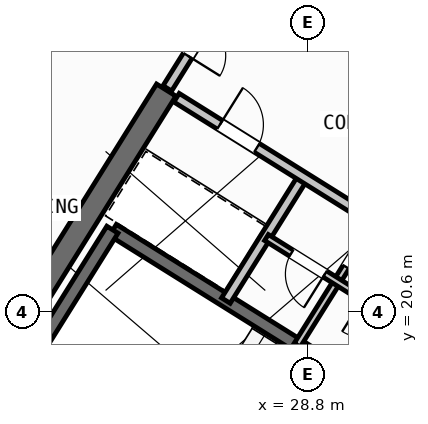
"""IFC4 building model, lengths in metres.
Left out: names, types, materials, properties, quantities, classifications, styles, units other than length and angle.
Written with IfcOpenShell. Run it as: python <this file> out.ifc"""

import sys

from ifc_helpers import new_model, si_unit, direction, frame, frame_2d, origin, place, context, subcontext, project, spatial, rectangle, extrude, source, transform, mapped, element, fill, save


model = new_model("IFC4")
c1 = context("Model", 3, precision=1e-05, world=origin(), true_north=direction((0.0, 1.0)))
c2 = subcontext(c1, "Body", "Model", "MODEL_VIEW")
j1 = project(units=[si_unit("LENGTHUNIT", "METRE"), si_unit("PLANEANGLEUNIT", "RADIAN")], contexts=[c1])
p1 = place(None, origin())
s1 = spatial("IfcSite", under=j1, at=p1, CompositionType="ELEMENT")
p2 = place(p1, origin())
s2 = spatial("IfcBuilding", under=s1, at=p2, CompositionType="ELEMENT")
p3 = place(p2, frame((0.0, 0.0, 277.2)))
s3 = spatial("IfcBuildingStorey", under=s2, at=p3, CompositionType="ELEMENT", Elevation=277.2)
p4 = place(p3, frame((40.531, 24.036, 0.0), z_axis=(0.0, 0.0, 1.0), x_axis=(-0.848048787466, 0.529918157905, 0.0)))
e1 = element("IfcWall", 1, at=p4, inside=s3, PredefinedType="SHEAR", context=c2, shape_type="SweptSolid", body=[
    extrude(rectangle(XDim=13.04, YDim=0.45, at=frame_2d((6.52, 0.0))), origin(), (0.0, 0.0, 1.0), 3.35),
])
p5 = place(p3, frame((26.007, 24.976, 0.0), z_axis=(0.0, 0.0, 1.0), x_axis=(-0.529931155655, -0.848040665456, 0.0)))
e2 = element("IfcWall", 2, at=p5, inside=s3, PredefinedType="SHEAR", context=c2, shape_type="SweptSolid", body=[
    extrude(rectangle(XDim=6.475, YDim=0.45, at=frame_2d((3.238, 0.0))), origin(), (0.0, 0.0, 1.0), 3.35),
])
p6 = place(p3, frame((29.268, 6.429, 0.0), z_axis=(0.0, 0.0, 1.0), x_axis=(-0.848049971435, 0.529916263149, 0.0)))
e3 = element("IfcWall", 3, at=p6, inside=s3, PredefinedType="STANDARD", context=c2, shape_type="SweptSolid", body=[
    extrude(rectangle(XDim=31.588, YDim=0.32, at=frame_2d((15.794, 0.0))), origin(), (0.0, 0.0, 1.0), 3.35),
])
p7 = place(p6, frame((16.362, 0.0, 0.0)))
e4 = element("IfcOpeningElement", 4, at=p7, cuts=e3, PredefinedType="OPENING", context=c2, shape_type="SweptSolid", body=[
    extrude(rectangle(XDim=1.2, YDim=2.15, at=frame_2d((0.6, 1.075))), frame((0.0, 0.17, 0.0), z_axis=(0.0, -1.0, 0.0), x_axis=(1.0, 0.0, 0.0)), (0.0, 0.0, 1.0), 0.34),
])
p8 = place(p6, frame((3.859, 0.0, 0.9)))
e5 = element("IfcOpeningElement", 5, at=p8, cuts=e3, PredefinedType="OPENING", context=c2, shape_type="SweptSolid", body=[
    extrude(rectangle(XDim=1.65, YDim=1.45, at=frame_2d((0.825, 0.725))), frame((0.0, 0.17, 0.0), z_axis=(0.0, -1.0, 0.0), x_axis=(1.0, 0.0, 0.0)), (0.0, 0.0, 1.0), 0.34),
])
p9 = place(p6, frame((10.519, 0.0, 0.9)))
e6 = element("IfcOpeningElement", 6, at=p9, cuts=e3, PredefinedType="OPENING", context=c2, shape_type="SweptSolid", body=[
    extrude(rectangle(XDim=1.65, YDim=1.45, at=frame_2d((0.825, 0.725))), frame((0.0, 0.17, 0.0), z_axis=(0.0, -1.0, 0.0), x_axis=(1.0, 0.0, 0.0)), (0.0, 0.0, 1.0), 0.34),
])
p10 = place(p6, frame((20.015, 0.0, 0.95)))
e7 = element("IfcOpeningElement", 7, at=p10, cuts=e3, PredefinedType="OPENING", context=c2, shape_type="SweptSolid", body=[
    extrude(rectangle(XDim=1.95, YDim=1.35, at=frame_2d((0.975, 0.675))), frame((0.0, 0.17, 0.0), z_axis=(0.0, -1.0, 0.0), x_axis=(1.0, 0.0, 0.0)), (0.0, 0.0, 1.0), 0.34),
])
p11 = place(p6, frame((23.715, 0.0, 1.0)))
e8 = element("IfcOpeningElement", 8, at=p11, cuts=e3, PredefinedType="OPENING", context=c2, shape_type="SweptSolid", body=[
    extrude(rectangle(XDim=0.9, YDim=1.25, at=frame_2d((0.45, 0.625))), frame((0.0, 0.17, 0.0), z_axis=(0.0, -1.0, 0.0), x_axis=(1.0, 0.0, 0.0)), (0.0, 0.0, 1.0), 0.34),
])
p12 = place(p6, frame((27.706, 0.0, 0.9)))
e9 = element("IfcOpeningElement", 9, at=p12, cuts=e3, PredefinedType="OPENING", context=c2, shape_type="SweptSolid", body=[
    extrude(rectangle(XDim=1.65, YDim=1.45, at=frame_2d((0.825, 0.725))), frame((0.0, 0.17, 0.0), z_axis=(0.0, -1.0, 0.0), x_axis=(1.0, 0.0, 0.0)), (0.0, 0.0, 1.0), 0.34),
])
p13 = place(p3, frame((14.138, 41.825, 0.0), z_axis=(0.0, 0.0, 1.0), x_axis=(0.848046498049, -0.529921821731, 0.0)))
e10 = element("IfcWall", 10, at=p13, inside=s3, PredefinedType="STANDARD", context=c2, shape_type="SweptSolid", body=[
    extrude(rectangle(XDim=31.588, YDim=0.32, at=frame_2d((15.794, 0.0))), origin(), (0.0, 0.0, 1.0), 3.35),
])
p14 = place(p13, frame((3.568, 0.0, 0.0)))
e11 = element("IfcOpeningElement", 11, at=p14, cuts=e10, PredefinedType="OPENING", context=c2, shape_type="SweptSolid", body=[
    extrude(rectangle(XDim=1.05, YDim=2.15, at=frame_2d((0.525, 1.075))), frame((0.0, 0.17, 0.0), z_axis=(0.0, -1.0, 0.0), x_axis=(1.0, 0.0, 0.0)), (0.0, 0.0, 1.0), 0.34),
])
p15 = place(p13, frame((1.046, 0.0, 0.9)))
e12 = element("IfcOpeningElement", 12, at=p15, cuts=e10, PredefinedType="OPENING", context=c2, shape_type="SweptSolid", body=[
    extrude(rectangle(XDim=1.65, YDim=1.45, at=frame_2d((0.825, 0.725))), frame((0.0, 0.17, 0.0), z_axis=(0.0, -1.0, 0.0), x_axis=(1.0, 0.0, 0.0)), (0.0, 0.0, 1.0), 0.34),
])
p16 = place(p13, frame((8.61, 0.0, 0.9)))
e13 = element("IfcOpeningElement", 13, at=p16, cuts=e10, PredefinedType="OPENING", context=c2, shape_type="SweptSolid", body=[
    extrude(rectangle(XDim=1.35, YDim=1.45, at=frame_2d((0.675, 0.725))), frame((0.0, 0.17, 0.0), z_axis=(0.0, -1.0, 0.0), x_axis=(1.0, 0.0, 0.0)), (0.0, 0.0, 1.0), 0.34),
])
p17 = place(p13, frame((13.599, 0.0, 0.95)))
e14 = element("IfcOpeningElement", 14, at=p17, cuts=e10, PredefinedType="OPENING", context=c2, shape_type="SweptSolid", body=[
    extrude(rectangle(XDim=1.95, YDim=1.35, at=frame_2d((0.975, 0.675))), frame((0.0, 0.17, 0.0), z_axis=(0.0, -1.0, 0.0), x_axis=(1.0, 0.0, 0.0)), (0.0, 0.0, 1.0), 0.34),
])
p18 = place(p13, frame((17.154, 0.0, 1.0)))
e15 = element("IfcOpeningElement", 15, at=p18, cuts=e10, PredefinedType="OPENING", context=c2, shape_type="SweptSolid", body=[
    extrude(rectangle(XDim=0.9, YDim=1.25, at=frame_2d((0.45, 0.625))), frame((0.0, 0.17, 0.0), z_axis=(0.0, -1.0, 0.0), x_axis=(1.0, 0.0, 0.0)), (0.0, 0.0, 1.0), 0.34),
])
p19 = place(p13, frame((21.719, 0.0, 0.9)))
e16 = element("IfcOpeningElement", 16, at=p19, cuts=e10, PredefinedType="OPENING", context=c2, shape_type="SweptSolid", body=[
    extrude(rectangle(XDim=1.65, YDim=1.45, at=frame_2d((0.825, 0.725))), frame((0.0, 0.17, 0.0), z_axis=(0.0, -1.0, 0.0), x_axis=(1.0, 0.0, 0.0)), (0.0, 0.0, 1.0), 0.34),
])
p20 = place(p13, frame((27.419, 0.0, 0.9)))
e17 = element("IfcOpeningElement", 17, at=p20, cuts=e10, PredefinedType="OPENING", context=c2, shape_type="SweptSolid", body=[
    extrude(rectangle(XDim=1.65, YDim=1.45, at=frame_2d((0.825, 0.725))), frame((0.0, 0.17, 0.0), z_axis=(0.0, -1.0, 0.0), x_axis=(1.0, 0.0, 0.0)), (0.0, 0.0, 1.0), 0.34),
])
p21 = place(p3, frame((31.28, 18.261, 0.0), z_axis=(0.0, 0.0, 1.0), x_axis=(-0.848051618787, 0.529913626805, 0.0)))
e18 = element("IfcWall", 18, at=p21, inside=s3, PredefinedType="SHEAR", context=c2, shape_type="SweptSolid", body=[
    extrude(rectangle(XDim=7.46, YDim=0.26, at=frame_2d((3.73, 0.0))), origin(), (0.0, 0.0, 1.0), 3.35),
])
p22 = place(p21, frame((0.36, 0.0, 0.0)))
e19 = element("IfcOpeningElement", 19, at=p22, cuts=e18, PredefinedType="OPENING", context=c2, shape_type="SweptSolid", body=[
    extrude(rectangle(XDim=0.86, YDim=2.05, at=frame_2d((0.43, 1.025))), frame((0.0, 0.14, 0.0), z_axis=(0.0, -1.0, 0.0), x_axis=(1.0, 0.0, 0.0)), (0.0, 0.0, 1.0), 0.28),
])
p23 = place(p3, frame((24.945, 22.22, 0.0), z_axis=(0.0, 0.0, 1.0), x_axis=(-0.529908658664, -0.84805472316, 0.0)))
e20 = element("IfcWall", 20, at=p23, inside=s3, PredefinedType="SHEAR", context=c2, shape_type="SweptSolid", body=[
    extrude(rectangle(XDim=3.16, YDim=0.26, at=frame_2d((1.58, 0.0))), origin(), (0.0, 0.0, 1.0), 3.35),
])
p24 = place(p3, frame((31.822, 24.998, 0.0), z_axis=(0.0, 0.0, 1.0), x_axis=(-0.848054125777, 0.529909614701, 0.0)))
e21 = element("IfcWall", 21, at=p24, inside=s3, PredefinedType="STANDARD", context=c2, shape_type="SweptSolid", body=[
    extrude(rectangle(XDim=4.668, YDim=0.2, at=frame_2d((2.334, 0.0))), origin(), (0.0, 0.0, 1.0), 3.34),
])
p25 = place(p24, frame((0.52, 0.0, 0.0)))
e22 = element("IfcOpeningElement", 22, at=p25, cuts=e21, PredefinedType="OPENING", context=c2, shape_type="SweptSolid", body=[
    extrude(rectangle(XDim=1.2, YDim=2.15, at=frame_2d((0.6, 1.075))), frame((0.0, 0.11, 0.0), z_axis=(0.0, -1.0, 0.0), x_axis=(1.0, 0.0, 0.0)), (0.0, 0.0, 1.0), 0.22),
])
p26 = place(p24, frame((2.54, 0.0, 0.0)))
e23 = element("IfcOpeningElement", 23, at=p26, cuts=e21, PredefinedType="OPENING", context=c2, shape_type="SweptSolid", body=[
    extrude(rectangle(XDim=1.2, YDim=2.15, at=frame_2d((0.6, 1.075))), frame((0.0, 0.11, 0.0), z_axis=(0.0, -1.0, 0.0), x_axis=(1.0, 0.0, 0.0)), (0.0, 0.0, 1.0), 0.22),
])
p27 = place(p3, frame((28.71, 23.263, 0.0), z_axis=(0.0, 0.0, 1.0), x_axis=(-0.529907497854, -0.848055448493, 0.0)))
e24 = element("IfcWall", 24, at=p27, inside=s3, PredefinedType="STANDARD", context=c2, shape_type="SweptSolid", body=[
    extrude(rectangle(XDim=2.88, YDim=0.2, at=frame_2d((1.44, 0.0))), origin(), (0.0, 0.0, 1.0), 3.34),
])
p28 = place(p3, frame((31.525, 21.504, 0.0), z_axis=(0.0, 0.0, 1.0), x_axis=(-0.848042066329, 0.529928913853, 0.0)))
e25 = element("IfcWall", 25, at=p28, inside=s3, PredefinedType="STANDARD", context=c2, shape_type="SweptSolid", body=[
    extrude(rectangle(XDim=6.268, YDim=0.2, at=frame_2d((3.134, 0.0))), origin(), (0.0, 0.0, 1.0), 3.34),
])
p29 = place(p28, frame((4.4, 0.0, 0.0)))
e26 = element("IfcOpeningElement", 26, at=p29, cuts=e25, PredefinedType="OPENING", context=c2, shape_type="SweptSolid", body=[
    extrude(rectangle(XDim=0.86, YDim=2.05, at=frame_2d((0.43, 1.025))), frame((0.0, 0.11, 0.0), z_axis=(0.0, -1.0, 0.0), x_axis=(1.0, 0.0, 0.0)), (0.0, 0.0, 1.0), 0.22),
])
p30 = place(p28, frame((0.35, 0.0, 0.0)))
e27 = element("IfcOpeningElement", 27, at=p30, cuts=e25, PredefinedType="OPENING", context=c2, shape_type="SweptSolid", body=[
    extrude(rectangle(XDim=0.86, YDim=2.05, at=frame_2d((0.43, 1.025))), frame((0.0, 0.11, 0.0), z_axis=(0.0, -1.0, 0.0), x_axis=(1.0, 0.0, 0.0)), (0.0, 0.0, 1.0), 0.22),
])
p31 = place(p3, frame((30.117, 22.384, 0.0), z_axis=(0.0, 0.0, 1.0), x_axis=(-0.529951914384, -0.848027693204, 0.0)))
e28 = element("IfcWall", 28, at=p31, inside=s3, PredefinedType="PLUMBINGWALL", context=c2, shape_type="SweptSolid", body=[
    extrude(rectangle(XDim=1.4, YDim=0.14, at=frame_2d((0.7, 0.0))), origin(), (0.0, 0.0, 1.0), 3.34),
])
p32 = place(p31, frame((0.28, 0.0, 0.0)))
e29 = element("IfcOpeningElement", 29, at=p32, cuts=e28, PredefinedType="OPENING", context=c2, shape_type="SweptSolid", body=[
    extrude(rectangle(XDim=0.78, YDim=2.05, at=frame_2d((0.39, 1.025))), frame((0.0, 0.08, 0.0), z_axis=(0.0, -1.0, 0.0), x_axis=(1.0, 0.0, 0.0)), (0.0, 0.0, 1.0), 0.16),
])
p33 = place(p3, frame((29.375, 21.196, 0.0), z_axis=(0.0, 0.0, 1.0), x_axis=(-0.529865479138, -0.848081702443, 0.0)))
e30 = element("IfcWall", 30, at=p33, inside=s3, PredefinedType="PLUMBINGWALL", context=c2, shape_type="SweptSolid", body=[
    extrude(rectangle(XDim=1.48, YDim=0.14, at=frame_2d((0.74, 0.0))), origin(), (0.0, 0.0, 1.0), 3.34),
])
p34 = place(p3, frame((30.766, 20.327, 0.0), z_axis=(0.0, 0.0, 1.0), x_axis=(-0.848052663127, 0.529911955482, 0.0)))
e31 = element("IfcWall", 31, at=p34, inside=s3, PredefinedType="PLUMBINGWALL", context=c2, shape_type="SweptSolid", body=[
    extrude(rectangle(XDim=3.28, YDim=0.14, at=frame_2d((1.64, 0.0))), origin(), (0.0, 0.0, 1.0), 3.34),
])
p35 = place(p34, frame((0.25, 0.0, 0.0)))
e32 = element("IfcOpeningElement", 32, at=p35, cuts=e31, PredefinedType="OPENING", context=c2, shape_type="SweptSolid", body=[
    extrude(rectangle(XDim=0.78, YDim=2.05, at=frame_2d((0.39, 1.025))), frame((0.0, 0.08, 0.0), z_axis=(0.0, -1.0, 0.0), x_axis=(1.0, 0.0, 0.0)), (0.0, 0.0, 1.0), 0.16),
])
p36 = place(p34, frame((1.92, 0.0, 0.0)))
e33 = element("IfcOpeningElement", 33, at=p36, cuts=e31, PredefinedType="OPENING", context=c2, shape_type="SweptSolid", body=[
    extrude(rectangle(XDim=0.78, YDim=2.05, at=frame_2d((0.39, 1.025))), frame((0.0, 0.08, 0.0), z_axis=(0.0, -1.0, 0.0), x_axis=(1.0, 0.0, 0.0)), (0.0, 0.0, 1.0), 0.16),
])
p37 = place(p3, frame((27.596, 27.52, 0.0), z_axis=(0.0, 0.0, 1.0), x_axis=(-0.529865479138, -0.848081702443, 0.0)))
e34 = element("IfcWall", 34, at=p37, inside=s3, PredefinedType="STANDARD", context=c2, shape_type="SweptSolid", body=[
    extrude(rectangle(XDim=2.96, YDim=0.2, at=frame_2d((1.48, 0.0))), origin(), (0.0, 0.0, 1.0), 3.34),
])
p38 = place(p37, frame((0.7, 0.0, 0.0)))
e35 = element("IfcOpeningElement", 35, at=p38, cuts=e34, PredefinedType="OPENING", context=c2, shape_type="SweptSolid", body=[
    extrude(rectangle(XDim=1.5, YDim=2.15, at=frame_2d((0.75, 1.075))), frame((0.0, 0.11, 0.0), z_axis=(0.0, -1.0, 0.0), x_axis=(1.0, 0.0, 0.0)), (0.0, 0.0, 1.0), 0.22),
])
p39 = place(p3, frame((24.588, 27.631, 0.0), z_axis=(0.0, 0.0, 1.0), x_axis=(-0.529914586043, -0.848051019396, 0.0)))
e36 = element("IfcWall", 36, at=p39, inside=s3, PredefinedType="PARTITIONING", context=c2, shape_type="SweptSolid", body=[
    extrude(rectangle(XDim=15.35, YDim=0.16, at=frame_2d((7.675, 0.0))), origin(), (0.0, 0.0, 1.0), 3.34),
])
m1 = source(origin(), c2, "Body", "SweptSolid", [
    extrude(rectangle(XDim=0.86, YDim=2.05, at=frame_2d((0.43, 1.025))), frame((0.0, 0.025, 0.0), z_axis=(0.0, -1.0, 0.0), x_axis=(1.0, 0.0, 0.0)), (0.0, 0.0, 1.0), 0.05),
])
p40 = place(p29, frame((0.86, 0.0, 0.0), z_axis=(0.0, 0.0, 1.0), x_axis=(-1.0, 0.0, 0.0)))
e37 = element("IfcDoor", 37, at=p40, inside=s3, OperationType="SINGLE_SWING_LEFT", PredefinedType="DOOR", context=c2, shape_type="MappedRepresentation", body=[
    mapped(m1, transform((0.0, 0.0, 0.0), scale=1.0)),
])
fill(e26, e37)
m2 = source(origin(), c2, "Body", "SweptSolid", [
    extrude(rectangle(XDim=0.78, YDim=2.05, at=frame_2d((0.39, 1.025))), frame((0.0, 0.025, 0.0), z_axis=(0.0, -1.0, 0.0), x_axis=(1.0, 0.0, 0.0)), (0.0, 0.0, 1.0), 0.05),
])
p41 = place(p32, origin())
e38 = element("IfcDoor", 38, at=p41, inside=s3, OperationType="SINGLE_SWING_LEFT", PredefinedType="DOOR", context=c2, shape_type="MappedRepresentation", body=[
    mapped(m2, transform((0.0, 0.0, 0.0), scale=1.0)),
])
fill(e29, e38)
p42 = place(p36, origin())
e39 = element("IfcDoor", 39, at=p42, inside=s3, OperationType="SINGLE_SWING_LEFT", PredefinedType="DOOR", context=c2, shape_type="MappedRepresentation", body=[
    mapped(m2, transform((0.0, 0.0, 0.0), scale=1.0)),
])
fill(e33, e39)
m3 = source(origin(), c2, "Body", "SweptSolid", [
    extrude(rectangle(XDim=1.5, YDim=2.15, at=frame_2d((0.75, 1.075))), frame((0.0, 0.025, 0.0), z_axis=(0.0, -1.0, 0.0), x_axis=(1.0, 0.0, 0.0)), (0.0, 0.0, 1.0), 0.05),
])
p43 = place(p38, origin())
e40 = element("IfcDoor", 40, at=p43, inside=s3, OperationType="DOUBLE_DOOR_SINGLE_SWING", PredefinedType="DOOR", context=c2, shape_type="MappedRepresentation", body=[
    mapped(m3, transform((0.0, 0.0, 0.0), scale=1.0)),
])
fill(e35, e40)
save(model, sys.argv[1])
